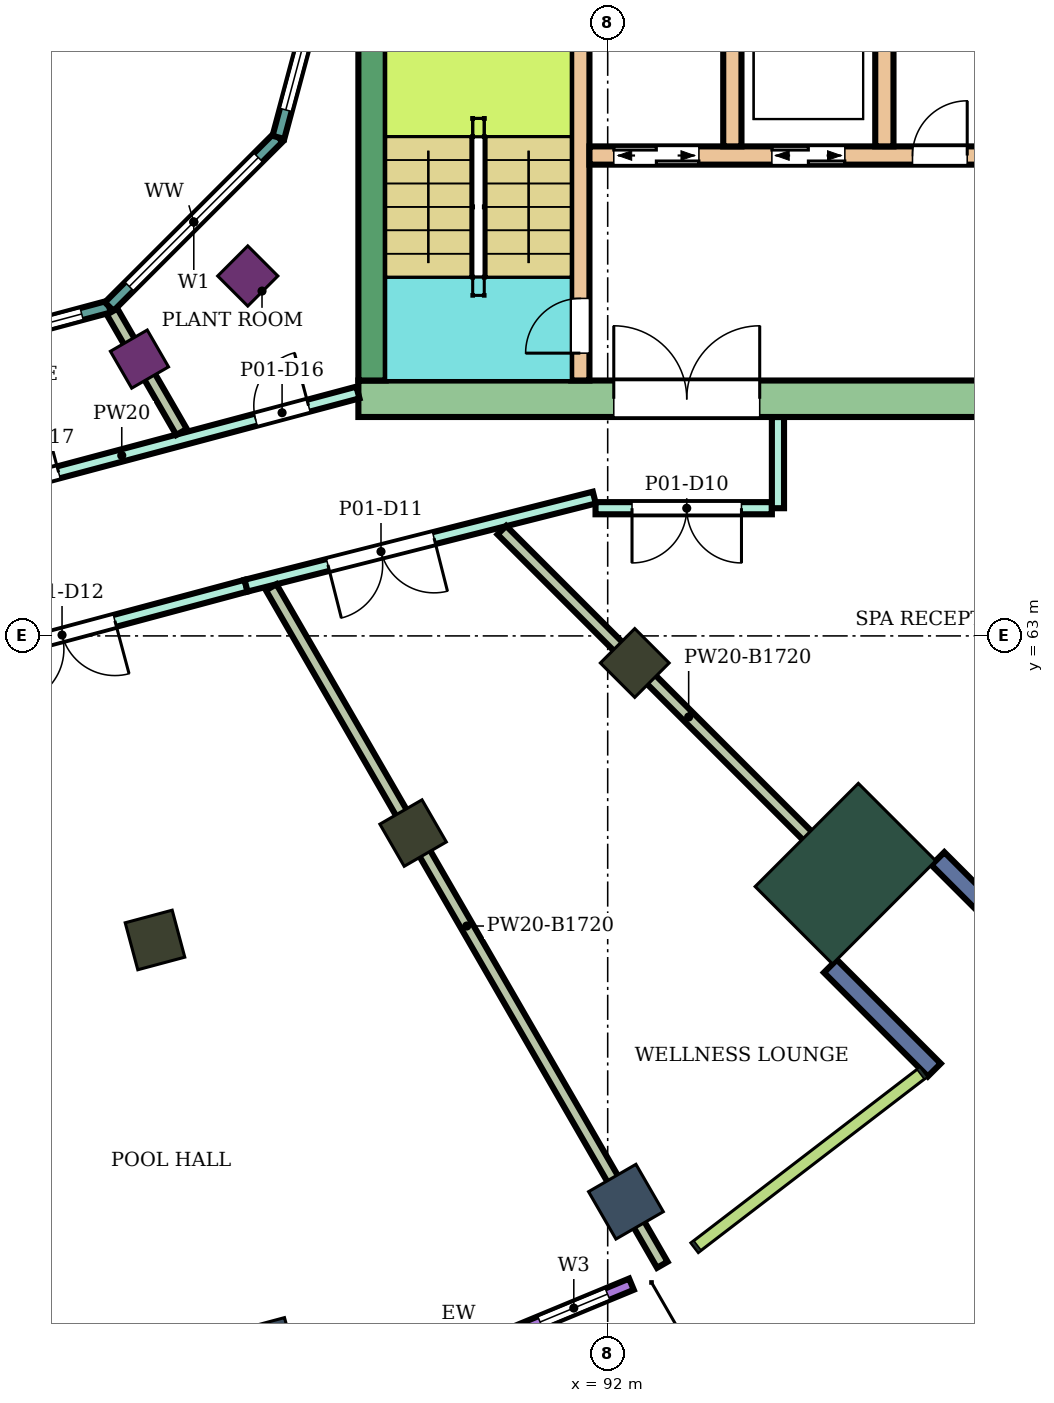
"""IFC4 building model, lengths in metres.
Left out: names, types, materials, properties, quantities, classifications, styles, units other than length and angle.
Written with IfcOpenShell. Run it as: python <this file> out.ifc"""

import sys

from ifc_helpers import new_model, si_unit, direction, frame, frame_2d, origin, origin_2d, place, context, subcontext, project, spatial, rectangle, extrude, element, fill, save


model = new_model("IFC4")
c1 = context("Model", 3, precision=1e-05, world=origin(), true_north=direction((0.0, 1.0)))
c2 = subcontext(c1, "Body", "Model", "MODEL_VIEW")
j1 = project(units=[si_unit("LENGTHUNIT", "METRE"), si_unit("PLANEANGLEUNIT", "RADIAN")], contexts=[c1])
p1 = place(None, origin())
s1 = spatial("IfcSite", under=j1, at=p1, CompositionType="ELEMENT")
p2 = place(p1, origin())
s2 = spatial("IfcBuilding", under=s1, at=p2, CompositionType="ELEMENT")
p3 = place(p2, frame((0.0, 0.0, 270.9)))
s3 = spatial("IfcBuildingStorey", under=s2, at=p3, CompositionType="ELEMENT", Elevation=270.9)
for number, where, z_axis, x_axis in (
    (1, (86.367, 51.238, 0.0), (0.0, 0.0, 1.0), (0.259, -0.966, 0.0)),
    (2, (92.3, 53.696, 0.0), (0.0, 0.0, 1.0), (0.5, -0.866, 0.0)),
):
    element("IfcColumn", number, at=place(p3, frame(where, z_axis=z_axis, x_axis=x_axis)), inside=s3, PredefinedType="COLUMN", context=c2, shape_type="SweptSolid", body=[
        extrude(rectangle(XDim=0.9, YDim=0.9, at=origin_2d()), origin(), (0.0, 0.0, 1.0), 4.8),
    ])
for number, where, z_axis, x_axis in (
    (3, (84.555, 58.0, 0.0), (0.0, 0.0, 1.0), (0.259, -0.966, 0.0)),
    (4, (88.8, 59.758, 0.0), (0.0, 0.0, 1.0), (0.5, -0.866, 0.0)),
    (5, (92.445, 62.555, 0.0), (0.0, 0.0, 1.0), (0.707, -0.707, 0.0)),
):
    element("IfcColumn", number, at=place(p3, frame(where, z_axis=z_axis, x_axis=x_axis)), inside=s3, PredefinedType="COLUMN", context=c2, shape_type="SweptSolid", body=[
        extrude(rectangle(XDim=0.8, YDim=0.8, at=origin_2d()), origin(), (0.0, 0.0, 1.0), 4.8),
    ])
for number, where, z_axis, x_axis in (
    (6, (84.3, 67.552, 0.0), (0.0, 0.0, 1.0), (0.5, -0.866, 0.0)),
    (7, (86.081, 68.919, 0.0), (0.0, 0.0, 1.0), (0.707, -0.707, 0.0)),
):
    element("IfcColumn", number, at=place(p3, frame(where, z_axis=z_axis, x_axis=x_axis)), inside=s3, PredefinedType="COLUMN", context=c2, shape_type="SweptSolid", body=[
        extrude(rectangle(XDim=0.7, YDim=0.7, at=origin_2d()), origin(), (0.0, 0.0, 1.0), 4.8),
    ])
p4 = place(p3, frame((95.91, 59.09, 0.0), z_axis=(0.0, 0.0, 1.0), x_axis=(0.707106781187, -0.707106781187, 0.0)))
e8 = element("IfcColumn", 8, at=p4, inside=s3, PredefinedType="COLUMN", context=c2, shape_type="SweptSolid", body=[
    extrude(rectangle(XDim=1.8, YDim=2.4, at=origin_2d()), origin(), (0.0, 0.0, 1.0), 4.8),
])
p5 = place(p3, frame((87.9, 66.9, 0.0), z_axis=(0.0, 0.0, 1.0), x_axis=(1.0, 0.0, 0.0)))
e9 = element("IfcWall", 9, at=p5, inside=s3, PredefinedType="SHEAR", context=c2, shape_type="SweptSolid", body=[
    extrude(rectangle(XDim=14.9, YDim=0.6, at=frame_2d((7.45, 0.0))), origin(), (0.0, 0.0, 1.0), 4.48),
])
p6 = place(p5, frame((4.2, 0.0, 0.0)))
e10 = element("IfcOpeningElement", 10, at=p6, cuts=e9, PredefinedType="OPENING", context=c2, shape_type="SweptSolid", body=[
    extrude(rectangle(XDim=2.4, YDim=2.4, at=frame_2d((1.2, 1.2))), frame((0.0, 0.31, 0.0), z_axis=(0.0, -1.0, 0.0), x_axis=(1.0, 0.0, 0.0)), (0.0, 0.0, 1.0), 0.62),
])
p7 = place(p3, frame((88.125, 67.2, 0.0), z_axis=(0.0, 0.0, 1.0), x_axis=(0.0, 1.0, 0.0)))
e11 = element("IfcWall", 11, at=p7, inside=s3, PredefinedType="SHEAR", context=c2, shape_type="SweptSolid", body=[
    extrude(rectangle(XDim=7.8, YDim=0.45, at=frame_2d((3.9, 0.0))), origin(), (0.0, 0.0, 1.0), 4.48),
])
p8 = place(p3, frame((91.55, 67.2, 0.0), z_axis=(0.0, 0.0, 1.0), x_axis=(0.0, 1.0, 0.0)))
e12 = element("IfcWall", 12, at=p8, inside=s3, PredefinedType="SHEAR", context=c2, shape_type="SweptSolid", body=[
    extrude(rectangle(XDim=7.8, YDim=0.3, at=frame_2d((3.9, 0.0))), origin(), (0.0, 0.0, 1.0), 4.48),
])
p9 = place(p8, frame((0.45, 0.0, 0.0)))
e13 = element("IfcOpeningElement", 13, at=p9, cuts=e12, PredefinedType="OPENING", context=c2, shape_type="SweptSolid", body=[
    extrude(rectangle(XDim=0.9, YDim=2.1, at=frame_2d((0.45, 1.05))), frame((0.0, 0.16, 0.0), z_axis=(0.0, -1.0, 0.0), x_axis=(1.0, 0.0, 0.0)), (0.0, 0.0, 1.0), 0.32),
])
p10 = place(p3, frame((91.7, 70.9, 0.0), z_axis=(0.0, 0.0, 1.0), x_axis=(1.0, 0.0, 0.0)))
e14 = element("IfcWall", 14, at=p10, inside=s3, PredefinedType="SHEAR", context=c2, shape_type="SweptSolid", body=[
    extrude(rectangle(XDim=11.1, YDim=0.3, at=frame_2d((5.55, 0.0))), origin(), (0.0, 0.0, 1.0), 4.48),
])
p11 = place(p10, frame((0.4, 0.0, 0.0)))
e15 = element("IfcOpeningElement", 15, at=p11, cuts=e14, PredefinedType="OPENING", context=c2, shape_type="SweptSolid", body=[
    extrude(rectangle(XDim=1.4, YDim=2.1, at=frame_2d((0.7, 1.05))), frame((0.0, 0.16, 0.0), z_axis=(0.0, -1.0, 0.0), x_axis=(1.0, 0.0, 0.0)), (0.0, 0.0, 1.0), 0.32),
])
p12 = place(p10, frame((3.0, 0.0, 0.0)))
e16 = element("IfcOpeningElement", 16, at=p12, cuts=e14, PredefinedType="OPENING", context=c2, shape_type="SweptSolid", body=[
    extrude(rectangle(XDim=1.2, YDim=2.1, at=frame_2d((0.6, 1.05))), frame((0.0, 0.16, 0.0), z_axis=(0.0, -1.0, 0.0), x_axis=(1.0, 0.0, 0.0)), (0.0, 0.0, 1.0), 0.32),
])
p13 = place(p10, frame((5.312, 0.0, 0.0)))
e17 = element("IfcOpeningElement", 17, at=p13, cuts=e14, PredefinedType="OPENING", context=c2, shape_type="SweptSolid", body=[
    extrude(rectangle(XDim=0.9, YDim=2.1, at=frame_2d((0.45, 1.05))), frame((0.0, 0.16, 0.0), z_axis=(0.0, -1.0, 0.0), x_axis=(1.0, 0.0, 0.0)), (0.0, 0.0, 1.0), 0.32),
])
p14 = place(p10, frame((8.363, 0.0, 0.0)))
e18 = element("IfcOpeningElement", 18, at=p14, cuts=e14, PredefinedType="OPENING", context=c2, shape_type="SweptSolid", body=[
    extrude(rectangle(XDim=0.9, YDim=2.1, at=frame_2d((0.45, 1.05))), frame((0.0, 0.16, 0.0), z_axis=(0.0, -1.0, 0.0), x_axis=(1.0, 0.0, 0.0)), (0.0, 0.0, 1.0), 0.32),
])
for number, where, z_axis, x_axis in (
    (19, (94.05, 71.05, 0.0), (0.0, 0.0, 1.0), (0.0, 1.0, 0.0)),
    (20, (96.55, 71.05, 0.0), (0.0, 0.0, 1.0), (0.0, 1.0, 0.0)),
):
    element("IfcWall", number, at=place(p3, frame(where, z_axis=z_axis, x_axis=x_axis)), inside=s3, PredefinedType="SHEAR", context=c2, shape_type="SweptSolid", body=[
        extrude(rectangle(XDim=2.55, YDim=0.3, at=frame_2d((1.275, 0.0))), origin(), (0.0, 0.0, 1.0), 4.48),
    ])
p15 = place(p3, frame((86.703, 49.983, 0.0), z_axis=(0.0, 0.0, 1.0), x_axis=(0.923881003904, 0.382679880089, 0.0)))
e21 = element("IfcWall", 21, at=p15, inside=s3, PredefinedType="NOTDEFINED", context=c2, shape_type="SweptSolid", body=[
    extrude(rectangle(XDim=6.156, YDim=0.2, at=frame_2d((3.078, 0.0))), origin(), (0.0, 0.0, 1.0), 4.8),
])
p16 = place(p15, frame((0.426, 0.0, 0.9)))
e22 = element("IfcOpeningElement", 22, at=p16, cuts=e21, PredefinedType="OPENING", context=c2, shape_type="SweptSolid", body=[
    extrude(rectangle(XDim=1.2, YDim=2.4, at=frame_2d((0.6, 1.2))), frame((0.0, 0.11, 0.0), z_axis=(0.0, -1.0, 0.0), x_axis=(1.0, 0.0, 0.0)), (0.0, 0.0, 1.0), 0.22),
])
p17 = place(p15, frame((2.178, 0.0, 0.0)))
e23 = element("IfcOpeningElement", 23, at=p17, cuts=e21, PredefinedType="OPENING", context=c2, shape_type="SweptSolid", body=[
    extrude(rectangle(XDim=1.8, YDim=2.4, at=frame_2d((0.9, 1.2))), frame((0.0, 0.11, 0.0), z_axis=(0.0, -1.0, 0.0), x_axis=(1.0, 0.0, 0.0)), (0.0, 0.0, 1.0), 0.22),
])
p18 = place(p15, frame((4.53, 0.0, 0.9)))
e24 = element("IfcOpeningElement", 24, at=p18, cuts=e21, PredefinedType="OPENING", context=c2, shape_type="SweptSolid", body=[
    extrude(rectangle(XDim=1.2, YDim=2.4, at=frame_2d((0.6, 1.2))), frame((0.0, 0.11, 0.0), z_axis=(0.0, -1.0, 0.0), x_axis=(1.0, 0.0, 0.0)), (0.0, 0.0, 1.0), 0.22),
])
for number, where, z_axis, x_axis in (
    (25, (95.662, 57.57, 0.0), (0.0, 0.0, 1.0), (0.707, -0.707, 0.0)),
    (26, (97.43, 59.338, 0.0), (0.0, 0.0, 1.0), (0.707, -0.707, 0.0)),
):
    element("IfcWall", number, at=place(p3, frame(where, z_axis=z_axis, x_axis=x_axis)), inside=s3, PredefinedType="NOTDEFINED", context=c2, shape_type="SweptSolid", body=[
        extrude(rectangle(XDim=2.416, YDim=0.3, at=frame_2d((1.208, 0.0))), origin(), (0.0, 0.0, 1.0), 4.8),
    ])
p19 = place(p3, frame((80.0, 67.396, 0.0), z_axis=(0.0, 0.0, 1.0), x_axis=(0.965933654434, 0.258789828301, 0.0)))
e27 = element("IfcWall", 27, at=p19, inside=s3, PredefinedType="NOTDEFINED", context=c2, shape_type="SweptSolid", body=[
    extrude(rectangle(XDim=3.936, YDim=0.2, at=frame_2d((1.968, 0.0))), origin(), (0.0, 0.0, 1.0), 4.8),
])
p20 = place(p19, frame((0.468, 0.0, 0.9)))
e28 = element("IfcOpeningElement", 28, at=p20, cuts=e27, PredefinedType="OPENING", context=c2, shape_type="SweptSolid", body=[
    extrude(rectangle(XDim=3.0, YDim=2.3, at=frame_2d((1.5, 1.15))), frame((0.0, 0.11, 0.0), z_axis=(0.0, -1.0, 0.0), x_axis=(1.0, 0.0, 0.0)), (0.0, 0.0, 1.0), 0.22),
])
p21 = place(p3, frame((83.802, 68.415, 0.0), z_axis=(0.0, 0.0, 1.0), x_axis=(0.707106781187, 0.707106781187, 0.0)))
e29 = element("IfcWall", 29, at=p21, inside=s3, PredefinedType="NOTDEFINED", context=c2, shape_type="SweptSolid", body=[
    extrude(rectangle(XDim=3.936, YDim=0.2, at=frame_2d((1.968, 0.0))), origin(), (0.0, 0.0, 1.0), 4.8),
])
p22 = place(p21, frame((0.468, 0.0, 0.9)))
e30 = element("IfcOpeningElement", 30, at=p22, cuts=e29, PredefinedType="OPENING", context=c2, shape_type="SweptSolid", body=[
    extrude(rectangle(XDim=3.0, YDim=2.3, at=frame_2d((1.5, 1.15))), frame((0.0, 0.11, 0.0), z_axis=(0.0, -1.0, 0.0), x_axis=(1.0, 0.0, 0.0)), (0.0, 0.0, 1.0), 0.22),
])
p23 = place(p3, frame((86.585, 71.198, 0.0), z_axis=(0.0, 0.0, 1.0), x_axis=(0.258789828301, 0.965933654434, 0.0)))
e31 = element("IfcWall", 31, at=p23, inside=s3, PredefinedType="NOTDEFINED", context=c2, shape_type="SweptSolid", body=[
    extrude(rectangle(XDim=3.936, YDim=0.2, at=frame_2d((1.968, 0.0))), origin(), (0.0, 0.0, 1.0), 4.8),
])
p24 = place(p23, frame((0.468, 0.0, 0.9)))
e32 = element("IfcOpeningElement", 32, at=p24, cuts=e31, PredefinedType="OPENING", context=c2, shape_type="SweptSolid", body=[
    extrude(rectangle(XDim=3.0, YDim=2.3, at=frame_2d((1.5, 1.15))), frame((0.0, 0.11, 0.0), z_axis=(0.0, -1.0, 0.0), x_axis=(1.0, 0.0, 0.0)), (0.0, 0.0, 1.0), 0.22),
])
p25 = place(p3, frame((80.125, 64.932, 0.0), z_axis=(0.0, 0.0, 1.0), x_axis=(0.966236955806, 0.257655089674, 0.0)))
e33 = element("IfcWall", 33, at=p25, inside=s3, PredefinedType="PARTITIONING", context=c2, shape_type="SweptSolid", body=[
    extrude(rectangle(XDim=8.039, YDim=0.2, at=frame_2d((4.02, 0.0))), origin(), (0.0, 0.0, 1.0), 4.35),
])
p26 = place(p25, frame((6.298, 0.0, 0.0)))
e34 = element("IfcOpeningElement", 34, at=p26, cuts=e33, PredefinedType="OPENING", context=c2, shape_type="SweptSolid", body=[
    extrude(rectangle(XDim=0.9, YDim=2.1, at=frame_2d((0.45, 1.05))), frame((0.0, 0.11, 0.0), z_axis=(0.0, -1.0, 0.0), x_axis=(1.0, 0.0, 0.0)), (0.0, 0.0, 1.0), 0.22),
])
p27 = place(p25, frame((2.045, 0.0, 0.0)))
e35 = element("IfcOpeningElement", 35, at=p27, cuts=e33, PredefinedType="OPENING", context=c2, shape_type="SweptSolid", body=[
    extrude(rectangle(XDim=0.9, YDim=2.1, at=frame_2d((0.45, 1.05))), frame((0.0, 0.11, 0.0), z_axis=(0.0, -1.0, 0.0), x_axis=(1.0, 0.0, 0.0)), (0.0, 0.0, 1.0), 0.22),
])
p28 = place(p3, frame((80.0, 62.204, 0.0), z_axis=(0.0, 0.0, 1.0), x_axis=(0.965938139786, 0.258773086132, 0.0)))
e36 = element("IfcWall", 36, at=p28, inside=s3, PredefinedType="PARTITIONING", context=c2, shape_type="SweptSolid", body=[
    extrude(rectangle(XDim=6.266, YDim=0.2, at=frame_2d((3.133, 0.0))), origin(), (0.0, 0.0, 1.0), 4.35),
])
p29 = place(p28, frame((2.233, 0.0, 0.0)))
e37 = element("IfcOpeningElement", 37, at=p29, cuts=e36, PredefinedType="OPENING", context=c2, shape_type="SweptSolid", body=[
    extrude(rectangle(XDim=1.8, YDim=2.1, at=frame_2d((0.9, 1.05))), frame((0.0, 0.11, 0.0), z_axis=(0.0, -1.0, 0.0), x_axis=(1.0, 0.0, 0.0)), (0.0, 0.0, 1.0), 0.22),
])
p30 = place(p3, frame((83.85, 68.333, 0.0), z_axis=(0.0, 0.0, 1.0), x_axis=(0.499953638813, -0.866052168773, 0.0)))
e38 = element("IfcWall", 38, at=p30, inside=s3, PredefinedType="PARTITIONING", context=c2, shape_type="SweptSolid", body=[
    extrude(rectangle(XDim=2.285, YDim=0.2, at=frame_2d((1.143, 0.0))), origin(), (0.0, 0.0, 1.0), 3.08),
])
p31 = place(p3, frame((86.053, 63.826, 0.0), z_axis=(0.0, 0.0, 1.0), x_axis=(0.969450593176, 0.245286663704, 0.0)))
e39 = element("IfcWall", 39, at=p31, inside=s3, PredefinedType="PARTITIONING", context=c2, shape_type="SweptSolid", body=[
    extrude(rectangle(XDim=5.907, YDim=0.2, at=frame_2d((2.954, 0.0))), origin(), (0.0, 0.0, 1.0), 4.35),
])
p32 = place(p31, frame((1.389, 0.0, 0.0)))
e40 = element("IfcOpeningElement", 40, at=p32, cuts=e39, PredefinedType="OPENING", context=c2, shape_type="SweptSolid", body=[
    extrude(rectangle(XDim=1.8, YDim=2.1, at=frame_2d((0.9, 1.05))), frame((0.0, 0.11, 0.0), z_axis=(0.0, -1.0, 0.0), x_axis=(1.0, 0.0, 0.0)), (0.0, 0.0, 1.0), 0.22),
])
p33 = place(p3, frame((86.466, 63.8, 0.0), z_axis=(0.0, 0.0, 1.0), x_axis=(0.499941480581, -0.866059187351, 0.0)))
e41 = element("IfcWall", 41, at=p33, inside=s3, PredefinedType="PARTITIONING", context=c2, shape_type="SweptSolid", body=[
    extrude(rectangle(XDim=12.865, YDim=0.2, at=frame_2d((6.433, 0.0))), origin(), (0.0, 0.0, 1.0), 3.08),
])
p34 = place(p3, frame((90.26, 64.739, 0.0), z_axis=(0.0, 0.0, 1.0), x_axis=(0.707050588015, -0.707162969893, 0.0)))
e42 = element("IfcWall", 42, at=p34, inside=s3, PredefinedType="PARTITIONING", context=c2, shape_type="SweptSolid", body=[
    extrude(rectangle(XDim=8.69, YDim=0.2, at=frame_2d((4.345, 0.0))), origin(), (0.0, 0.0, 1.0), 3.08),
])
p35 = place(p3, frame((91.8, 65.1, 0.0), z_axis=(0.0, 0.0, 1.0), x_axis=(1.0, 0.0, 0.0)))
e43 = element("IfcWall", 43, at=p35, inside=s3, PredefinedType="PARTITIONING", context=c2, shape_type="SweptSolid", body=[
    extrude(rectangle(XDim=2.9, YDim=0.2, at=frame_2d((1.45, 0.0))), origin(), (0.0, 0.0, 1.0), 4.35),
])
p36 = place(p35, frame((0.6, 0.0, 0.0)))
e44 = element("IfcOpeningElement", 44, at=p36, cuts=e43, PredefinedType="OPENING", context=c2, shape_type="SweptSolid", body=[
    extrude(rectangle(XDim=1.8, YDim=2.1, at=frame_2d((0.9, 1.05))), frame((0.0, 0.11, 0.0), z_axis=(0.0, -1.0, 0.0), x_axis=(1.0, 0.0, 0.0)), (0.0, 0.0, 1.0), 0.22),
])
p37 = place(p3, frame((94.8, 65.1, 0.0), z_axis=(0.0, 0.0, 1.0), x_axis=(0.0, 1.0, 0.0)))
e45 = element("IfcWall", 45, at=p37, inside=s3, PredefinedType="PARTITIONING", context=c2, shape_type="SweptSolid", body=[
    extrude(rectangle(XDim=1.499, YDim=0.2, at=frame_2d((0.75, 0.0))), origin(), (0.0, 0.0, 1.0), 4.35),
])
p38 = place(p18, origin())
e46 = element("IfcWindow", 46, at=p38, inside=s3, PartitioningType="SINGLE_PANEL", PredefinedType="WINDOW", context=c2, shape_type="SweptSolid", body=[
    extrude(rectangle(XDim=1.2, YDim=2.4, at=frame_2d((0.6, 1.2))), frame((0.0, 0.03, 0.0), z_axis=(0.0, -1.0, 0.0), x_axis=(1.0, 0.0, 0.0)), (0.0, 0.0, 1.0), 0.06),
])
fill(e24, e46)
p39 = place(p20, origin())
e47 = element("IfcWindow", 47, at=p39, inside=s3, PartitioningType="SINGLE_PANEL", PredefinedType="WINDOW", context=c2, shape_type="SweptSolid", body=[
    extrude(rectangle(XDim=3.0, YDim=2.3, at=frame_2d((1.5, 1.15))), frame((0.0, 0.03, 0.0), z_axis=(0.0, -1.0, 0.0), x_axis=(1.0, 0.0, 0.0)), (0.0, 0.0, 1.0), 0.06),
])
fill(e28, e47)
p40 = place(p22, origin())
e48 = element("IfcWindow", 48, at=p40, inside=s3, PartitioningType="SINGLE_PANEL", PredefinedType="WINDOW", context=c2, shape_type="SweptSolid", body=[
    extrude(rectangle(XDim=3.0, YDim=2.3, at=frame_2d((1.5, 1.15))), frame((0.0, 0.03, 0.0), z_axis=(0.0, -1.0, 0.0), x_axis=(1.0, 0.0, 0.0)), (0.0, 0.0, 1.0), 0.06),
])
fill(e30, e48)
p41 = place(p24, origin())
e49 = element("IfcWindow", 49, at=p41, inside=s3, PartitioningType="SINGLE_PANEL", PredefinedType="WINDOW", context=c2, shape_type="SweptSolid", body=[
    extrude(rectangle(XDim=3.0, YDim=2.3, at=frame_2d((1.5, 1.15))), frame((0.0, 0.03, 0.0), z_axis=(0.0, -1.0, 0.0), x_axis=(1.0, 0.0, 0.0)), (0.0, 0.0, 1.0), 0.06),
])
fill(e32, e49)
p42 = place(p36, frame((1.8, 0.0, 0.0), z_axis=(0.0, 0.0, 1.0), x_axis=(-1.0, 0.0, 0.0)))
e50 = element("IfcDoor", 50, at=p42, inside=s3, OperationType="DOUBLE_DOOR_SINGLE_SWING", PredefinedType="DOOR", context=c2, shape_type="SweptSolid", body=[
    extrude(rectangle(XDim=1.8, YDim=2.1, at=frame_2d((0.9, 1.05))), frame((0.0, 0.025, 0.0), z_axis=(0.0, -1.0, 0.0), x_axis=(1.0, 0.0, 0.0)), (0.0, 0.0, 1.0), 0.05),
])
fill(e44, e50)
p43 = place(p32, frame((1.8, 0.0, 0.0), z_axis=(0.0, 0.0, 1.0), x_axis=(-1.0, 0.0, 0.0)))
e51 = element("IfcDoor", 51, at=p43, inside=s3, OperationType="DOUBLE_DOOR_SINGLE_SWING", PredefinedType="DOOR", context=c2, shape_type="SweptSolid", body=[
    extrude(rectangle(XDim=1.8, YDim=2.1, at=frame_2d((0.9, 1.05))), frame((0.0, 0.025, 0.0), z_axis=(0.0, -1.0, 0.0), x_axis=(1.0, 0.0, 0.0)), (0.0, 0.0, 1.0), 0.05),
])
fill(e40, e51)
p44 = place(p29, frame((1.8, 0.0, 0.0), z_axis=(0.0, 0.0, 1.0), x_axis=(-1.0, 0.0, 0.0)))
e52 = element("IfcDoor", 52, at=p44, inside=s3, OperationType="DOUBLE_DOOR_SINGLE_SWING", PredefinedType="DOOR", context=c2, shape_type="SweptSolid", body=[
    extrude(rectangle(XDim=1.8, YDim=2.1, at=frame_2d((0.9, 1.05))), frame((0.0, 0.025, 0.0), z_axis=(0.0, -1.0, 0.0), x_axis=(1.0, 0.0, 0.0)), (0.0, 0.0, 1.0), 0.05),
])
fill(e37, e52)
p45 = place(p26, origin())
e53 = element("IfcDoor", 53, at=p45, inside=s3, OperationType="SINGLE_SWING_RIGHT", PredefinedType="DOOR", context=c2, shape_type="SweptSolid", body=[
    extrude(rectangle(XDim=0.9, YDim=2.1, at=frame_2d((0.45, 1.05))), frame((0.0, 0.025, 0.0), z_axis=(0.0, -1.0, 0.0), x_axis=(1.0, 0.0, 0.0)), (0.0, 0.0, 1.0), 0.05),
])
fill(e34, e53)
p46 = place(p27, origin())
e54 = element("IfcDoor", 54, at=p46, inside=s3, OperationType="SINGLE_SWING_RIGHT", PredefinedType="DOOR", context=c2, shape_type="SweptSolid", body=[
    extrude(rectangle(XDim=0.9, YDim=2.1, at=frame_2d((0.45, 1.05))), frame((0.0, 0.025, 0.0), z_axis=(0.0, -1.0, 0.0), x_axis=(1.0, 0.0, 0.0)), (0.0, 0.0, 1.0), 0.05),
])
fill(e35, e54)
p47 = place(p9, origin())
e55 = element("IfcDoor", 55, at=p47, inside=s3, OperationType="SINGLE_SWING_LEFT", PredefinedType="DOOR", context=c2, shape_type="SweptSolid", body=[
    extrude(rectangle(XDim=0.9, YDim=2.1, at=frame_2d((0.45, 1.05))), frame((0.0, 0.025, 0.0), z_axis=(0.0, -1.0, 0.0), x_axis=(1.0, 0.0, 0.0)), (0.0, 0.0, 1.0), 0.05),
])
fill(e13, e55)
p48 = place(p11, origin())
e56 = element("IfcDoor", 56, at=p48, inside=s3, OperationType="DOUBLE_DOOR_SLIDING", PredefinedType="DOOR", context=c2, shape_type="SweptSolid", body=[
    extrude(rectangle(XDim=1.4, YDim=2.1, at=frame_2d((0.7, 1.05))), frame((0.0, 0.025, 0.0), z_axis=(0.0, -1.0, 0.0), x_axis=(1.0, 0.0, 0.0)), (0.0, 0.0, 1.0), 0.05),
])
fill(e15, e56)
p49 = place(p12, origin())
e57 = element("IfcDoor", 57, at=p49, inside=s3, OperationType="DOUBLE_DOOR_SLIDING", PredefinedType="DOOR", context=c2, shape_type="SweptSolid", body=[
    extrude(rectangle(XDim=1.2, YDim=2.1, at=frame_2d((0.6, 1.05))), frame((0.0, 0.025, 0.0), z_axis=(0.0, -1.0, 0.0), x_axis=(1.0, 0.0, 0.0)), (0.0, 0.0, 1.0), 0.05),
])
fill(e16, e57)
p50 = place(p13, origin())
e58 = element("IfcDoor", 58, at=p50, inside=s3, OperationType="SINGLE_SWING_RIGHT", PredefinedType="DOOR", context=c2, shape_type="SweptSolid", body=[
    extrude(rectangle(XDim=0.9, YDim=2.1, at=frame_2d((0.45, 1.05))), frame((0.0, 0.025, 0.0), z_axis=(0.0, -1.0, 0.0), x_axis=(1.0, 0.0, 0.0)), (0.0, 0.0, 1.0), 0.05),
])
fill(e17, e58)
p51 = place(p6, origin())
e59 = element("IfcDoor", 59, at=p51, inside=s3, OperationType="DOUBLE_DOOR_SINGLE_SWING", PredefinedType="DOOR", context=c2, shape_type="SweptSolid", body=[
    extrude(rectangle(XDim=2.4, YDim=2.4, at=frame_2d((1.2, 1.2))), frame((0.0, 0.025, 0.0), z_axis=(0.0, -1.0, 0.0), x_axis=(1.0, 0.0, 0.0)), (0.0, 0.0, 1.0), 0.05),
])
fill(e10, e59)
save(model, sys.argv[1])
